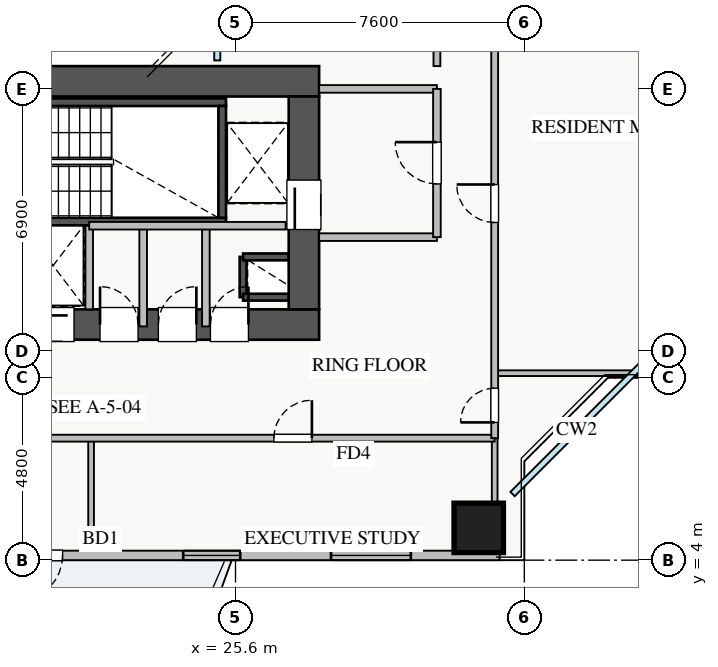
"""IFC4 building model, lengths in metres.
Left out: names, types, materials, properties, quantities, classifications, styles, units other than length and angle.
Written with IfcOpenShell. Run it as: python <this file> out.ifc"""

import sys

from ifc_helpers import new_model, si_unit, direction, frame, frame_2d, origin, origin_2d, place, context, subcontext, project, spatial, rectangle, extrude, source, transform, mapped, element, fill, save


model = new_model("IFC4")
c1 = context("Model", 3, precision=1e-05, world=origin(), true_north=direction((0.0, 1.0)))
c2 = subcontext(c1, "Body", "Model", "MODEL_VIEW")
j1 = project(units=[si_unit("LENGTHUNIT", "METRE"), si_unit("PLANEANGLEUNIT", "RADIAN")], contexts=[c1])
p1 = place(None, origin())
s1 = spatial("IfcSite", under=j1, at=p1, CompositionType="ELEMENT")
p2 = place(p1, origin())
s2 = spatial("IfcBuilding", under=s1, at=p2, CompositionType="ELEMENT")
p3 = place(p2, frame((0.0, 0.0, 82.75)))
s3 = spatial("IfcBuildingStorey", under=s2, at=p3, CompositionType="ELEMENT", Elevation=82.75)
p4 = place(p3, frame((25.8, 10.92, 0.0), z_axis=(0.0, 0.0, 1.0), x_axis=(0.0, 1.0, 0.0)))
e1 = element("IfcWall", 1, at=p4, inside=s3, PredefinedType="SHEAR", context=c2, shape_type="SweptSolid", body=[
    extrude(rectangle(XDim=1.06, YDim=0.18, at=frame_2d((0.53, 0.0))), origin(), (0.0, 0.0, 1.0), 3.07),
])
for number, where, z_axis, x_axis in (
    (2, (25.8, 11.98, 0.0), (0.0, 0.0, 1.0), (1.0, 0.0, 0.0)),
    (3, (25.8, 10.92, 0.0), (0.0, 0.0, 1.0), (1.0, 0.0, 0.0)),
):
    element("IfcWall", number, at=place(p3, frame(where, z_axis=z_axis, x_axis=x_axis)), inside=s3, PredefinedType="SHEAR", context=c2, shape_type="SweptSolid", body=[
        extrude(rectangle(XDim=1.2, YDim=0.18, at=frame_2d((0.6, 0.0))), origin(), (0.0, 0.0, 1.0), 3.07),
    ])
p5 = place(p3, frame((19.88, 12.8, 0.0), z_axis=(0.0, 0.0, 1.0), x_axis=(1.0, 0.0, 0.0)))
e4 = element("IfcWall", 4, at=p5, inside=s3, PredefinedType="SHEAR", context=c2, shape_type="SweptSolid", body=[
    extrude(rectangle(XDim=1.87, YDim=0.18, at=frame_2d((0.935, 0.0))), origin(), (0.0, 0.0, 1.0), 3.07),
])
p6 = place(p3, frame((18.2, 12.91, 0.0), z_axis=(0.0, 0.0, 1.0), x_axis=(1.0, 0.0, 0.0)))
e5 = element("IfcWall", 5, at=p6, inside=s3, PredefinedType="SHEAR", context=c2, shape_type="SweptSolid", body=[
    extrude(rectangle(XDim=7.15, YDim=0.2, at=frame_2d((3.575, 0.0))), origin(), (0.0, 0.0, 1.0), 3.25),
])
p7 = place(p6, frame((0.35, 0.0, 0.0)))
e6 = element("IfcOpeningElement", 6, at=p7, cuts=e5, PredefinedType="OPENING", context=c2, shape_type="SweptSolid", body=[
    extrude(rectangle(XDim=1.1, YDim=2.05, at=frame_2d((0.55, 1.025))), frame((0.0, 0.11, 0.0), z_axis=(0.0, -1.0, 0.0), x_axis=(1.0, 0.0, 0.0)), (0.0, 0.0, 1.0), 0.22),
])
p8 = place(p3, frame((18.2, 16.05, 0.0), z_axis=(0.0, 0.0, 1.0), x_axis=(1.0, 0.0, 0.0)))
e7 = element("IfcWall", 7, at=p8, inside=s3, PredefinedType="SHEAR", context=c2, shape_type="SweptSolid", body=[
    extrude(rectangle(XDim=7.15, YDim=0.2, at=frame_2d((3.575, 0.0))), origin(), (0.0, 0.0, 1.0), 3.25),
])
p9 = place(p3, frame((25.25, 13.01, 0.0), z_axis=(0.0, 0.0, 1.0), x_axis=(0.0, 1.0, 0.0)))
e8 = element("IfcWall", 8, at=p9, inside=s3, PredefinedType="SHEAR", context=c2, shape_type="SweptSolid", body=[
    extrude(rectangle(XDim=2.94, YDim=0.2, at=frame_2d((1.47, 0.0))), origin(), (0.0, 0.0, 1.0), 3.25),
])
p10 = place(p3, frame((10.2, 10.2, 0.0), z_axis=(0.0, 0.0, 1.0), x_axis=(1.0, 0.0, 0.0)))
e9 = element("IfcWall", 9, at=p10, inside=s3, PredefinedType="SHEAR", context=c2, shape_type="SweptSolid", body=[
    extrude(rectangle(XDim=17.6, YDim=0.8, at=frame_2d((8.8, 0.0))), origin(), (0.0, 0.0, 1.0), 3.25),
])
p11 = place(p10, frame((1.15, 0.0, 0.0)))
e10 = element("IfcOpeningElement", 10, at=p11, cuts=e9, PredefinedType="OPENING", context=c2, shape_type="SweptSolid", body=[
    extrude(rectangle(XDim=1.1, YDim=2.05, at=frame_2d((0.55, 1.025))), frame((0.0, 0.41, 0.0), z_axis=(0.0, -1.0, 0.0), x_axis=(1.0, 0.0, 0.0)), (0.0, 0.0, 1.0), 0.82),
])
p12 = place(p10, frame((8.3, 0.0, 0.0)))
e11 = element("IfcOpeningElement", 11, at=p12, cuts=e9, PredefinedType="OPENING", context=c2, shape_type="SweptSolid", body=[
    extrude(rectangle(XDim=1.1, YDim=2.05, at=frame_2d((0.55, 1.025))), frame((0.0, 0.41, 0.0), z_axis=(0.0, -1.0, 0.0), x_axis=(1.0, 0.0, 0.0)), (0.0, 0.0, 1.0), 0.82),
])
p13 = place(p10, frame((10.05, 0.0, 0.0)))
e12 = element("IfcOpeningElement", 12, at=p13, cuts=e9, PredefinedType="OPENING", context=c2, shape_type="SweptSolid", body=[
    extrude(rectangle(XDim=1.1, YDim=2.05, at=frame_2d((0.55, 1.025))), frame((0.0, 0.41, 0.0), z_axis=(0.0, -1.0, 0.0), x_axis=(1.0, 0.0, 0.0)), (0.0, 0.0, 1.0), 0.82),
])
p14 = place(p10, frame((14.74, 0.0, 0.0)))
e13 = element("IfcOpeningElement", 13, at=p14, cuts=e9, PredefinedType="OPENING", context=c2, shape_type="SweptSolid", body=[
    extrude(rectangle(XDim=1.0, YDim=2.05, at=frame_2d((0.5, 1.025))), frame((0.0, 0.41, 0.0), z_axis=(0.0, -1.0, 0.0), x_axis=(1.0, 0.0, 0.0)), (0.0, 0.0, 1.0), 0.82),
])
p15 = place(p10, frame((11.835, 0.0, 0.0)))
e14 = element("IfcOpeningElement", 14, at=p15, cuts=e9, PredefinedType="OPENING", context=c2, shape_type="SweptSolid", body=[
    extrude(rectangle(XDim=1.0, YDim=2.05, at=frame_2d((0.5, 1.025))), frame((0.0, 0.41, 0.0), z_axis=(0.0, -1.0, 0.0), x_axis=(1.0, 0.0, 0.0)), (0.0, 0.0, 1.0), 0.82),
])
p16 = place(p10, frame((13.37, 0.0, 0.0)))
e15 = element("IfcOpeningElement", 15, at=p16, cuts=e9, PredefinedType="OPENING", context=c2, shape_type="SweptSolid", body=[
    extrude(rectangle(XDim=1.0, YDim=2.05, at=frame_2d((0.5, 1.025))), frame((0.0, 0.41, 0.0), z_axis=(0.0, -1.0, 0.0), x_axis=(1.0, 0.0, 0.0)), (0.0, 0.0, 1.0), 0.82),
])
p17 = place(p3, frame((10.2, 16.6, 0.0), z_axis=(0.0, 0.0, 1.0), x_axis=(1.0, 0.0, 0.0)))
e16 = element("IfcWall", 16, at=p17, inside=s3, PredefinedType="SHEAR", context=c2, shape_type="SweptSolid", body=[
    extrude(rectangle(XDim=17.6, YDim=0.8, at=frame_2d((8.8, 0.0))), origin(), (0.0, 0.0, 1.0), 3.25),
])
p18 = place(p3, frame((27.4, 10.6, 0.0), z_axis=(0.0, 0.0, 1.0), x_axis=(0.0, 1.0, 0.0)))
e17 = element("IfcWall", 17, at=p18, inside=s3, PredefinedType="SHEAR", context=c2, shape_type="SweptSolid", body=[
    extrude(rectangle(XDim=5.6, YDim=0.8, at=frame_2d((2.8, 0.0))), origin(), (0.0, 0.0, 1.0), 3.25),
])
p19 = place(p18, frame((2.1, 0.0, 0.0)))
e18 = element("IfcOpeningElement", 18, at=p19, cuts=e17, PredefinedType="OPENING", context=c2, shape_type="SweptSolid", body=[
    extrude(rectangle(XDim=1.3, YDim=2.05, at=frame_2d((0.65, 1.025))), frame((0.0, 0.41, 0.0), z_axis=(0.0, -1.0, 0.0), x_axis=(1.0, 0.0, 0.0)), (0.0, 0.0, 1.0), 0.82),
])
m1 = source(origin(), c2, "Body", "SweptSolid", [
    extrude(rectangle(XDim=1.3, YDim=1.3, at=origin_2d()), origin(), (0.0, 0.0, 1.0), 3.25),
])
p20 = place(p3, frame((32.0, 4.85, 0.0), z_axis=(0.0, 0.0, 1.0), x_axis=(1.0, 0.0, 0.0)))
e19 = element("IfcColumn", 19, at=p20, inside=s3, PredefinedType="COLUMN", context=c2, shape_type="MappedRepresentation", body=[
    mapped(m1, transform((0.0, 0.0, 0.0), x_axis=(1.0, 0.0, 0.0), y_axis=(0.0, 1.0, 0.0), z_axis=(0.0, 0.0, 1.0), scale=1.0)),
])
p21 = place(p3, frame((5.45, 4.125, 0.0), z_axis=(0.0, 0.0, 1.0), x_axis=(1.0, 0.0, 0.0)))
e20 = element("IfcWall", 20, at=p21, inside=s3, PredefinedType="STANDARD", context=c2, shape_type="SweptSolid", body=[
    extrude(rectangle(XDim=27.1, YDim=0.25, at=frame_2d((13.55, 0.0))), origin(), (0.0, 0.0, 1.0), 2.61),
])
p22 = place(p21, frame((14.4, 0.0, 0.0)))
e21 = element("IfcOpeningElement", 21, at=p22, cuts=e20, PredefinedType="OPENING", context=c2, shape_type="SweptSolid", body=[
    extrude(rectangle(XDim=1.2, YDim=2.1, at=frame_2d((0.6, 1.05))), frame((0.0, 0.135, 0.0), z_axis=(0.0, -1.0, 0.0), x_axis=(1.0, 0.0, 0.0)), (0.0, 0.0, 1.0), 0.27),
])
p23 = place(p21, frame((1.365, 0.0, 0.9)))
e22 = element("IfcOpeningElement", 22, at=p23, cuts=e20, PredefinedType="OPENING", context=c2, shape_type="SweptSolid", body=[
    extrude(rectangle(XDim=1.8, YDim=1.5, at=frame_2d((0.9, 0.75))), frame((0.0, 0.135, 0.0), z_axis=(0.0, -1.0, 0.0), x_axis=(1.0, 0.0, 0.0)), (0.0, 0.0, 1.0), 0.27),
])
p24 = place(p21, frame((9.263, 0.0, 0.9)))
e23 = element("IfcOpeningElement", 23, at=p24, cuts=e20, PredefinedType="OPENING", context=c2, shape_type="SweptSolid", body=[
    extrude(rectangle(XDim=1.8, YDim=1.45, at=frame_2d((0.9, 0.725))), frame((0.0, 0.135, 0.0), z_axis=(0.0, -1.0, 0.0), x_axis=(1.0, 0.0, 0.0)), (0.0, 0.0, 1.0), 0.27),
])
p25 = place(p21, frame((18.774, 0.0, 0.9)))
e24 = element("IfcOpeningElement", 24, at=p25, cuts=e20, PredefinedType="OPENING", context=c2, shape_type="SweptSolid", body=[
    extrude(rectangle(XDim=1.5, YDim=1.5, at=frame_2d((0.75, 0.75))), frame((0.0, 0.135, 0.0), z_axis=(0.0, -1.0, 0.0), x_axis=(1.0, 0.0, 0.0)), (0.0, 0.0, 1.0), 0.27),
])
p26 = place(p21, frame((22.663, 0.0, 0.9)))
e25 = element("IfcOpeningElement", 25, at=p26, cuts=e20, PredefinedType="OPENING", context=c2, shape_type="SweptSolid", body=[
    extrude(rectangle(XDim=2.1, YDim=1.48, at=frame_2d((1.05, 0.74))), frame((0.0, 0.135, 0.0), z_axis=(0.0, -1.0, 0.0), x_axis=(1.0, 0.0, 0.0)), (0.0, 0.0, 1.0), 0.27),
])
p27 = place(p21, frame((5.149, 0.0, 0.9)))
e26 = element("IfcOpeningElement", 26, at=p27, cuts=e20, PredefinedType="OPENING", context=c2, shape_type="SweptSolid", body=[
    extrude(rectangle(XDim=2.4, YDim=1.5, at=frame_2d((1.2, 0.75))), frame((0.0, 0.135, 0.0), z_axis=(0.0, -1.0, 0.0), x_axis=(1.0, 0.0, 0.0)), (0.0, 0.0, 1.0), 0.27),
])
for number, where, z_axis, x_axis in (
    (27, (27.8, 16.4, 0.0), (0.0, 0.0, 1.0), (1.0, 0.0, 0.0)),
    (28, (27.8, 12.5, 0.0), (0.0, 0.0, 1.0), (1.0, 0.0, 0.0)),
):
    element("IfcWall", number, at=place(p3, frame(where, z_axis=z_axis, x_axis=x_axis)), inside=s3, PredefinedType="PARTITIONING", context=c2, shape_type="SweptSolid", body=[
        extrude(rectangle(XDim=3.1, YDim=0.2, at=frame_2d((1.55, 0.0))), origin(), (0.0, 0.0, 1.0), 3.07),
    ])
p28 = place(p3, frame((30.9, 12.5, 0.0), z_axis=(0.0, 0.0, 1.0), x_axis=(0.0, 1.0, 0.0)))
e29 = element("IfcWall", 29, at=p28, inside=s3, PredefinedType="PARTITIONING", context=c2, shape_type="SweptSolid", body=[
    extrude(rectangle(XDim=3.9, YDim=0.2, at=frame_2d((1.95, 0.0))), origin(), (0.0, 0.0, 1.0), 3.07),
])
p29 = place(p28, frame((1.4, 0.0, 0.0)))
e30 = element("IfcOpeningElement", 30, at=p29, cuts=e29, PredefinedType="OPENING", context=c2, shape_type="SweptSolid", body=[
    extrude(rectangle(XDim=1.1, YDim=2.05, at=frame_2d((0.55, 1.025))), frame((0.0, 0.11, 0.0), z_axis=(0.0, -1.0, 0.0), x_axis=(1.0, 0.0, 0.0)), (0.0, 0.0, 1.0), 0.22),
])
p30 = place(p3, frame((24.82, 10.15, 0.0), z_axis=(0.0, 0.0, 1.0), x_axis=(0.0, 1.0, 0.0)))
e31 = element("IfcWall", 31, at=p30, inside=s3, PredefinedType="PARTITIONING", context=c2, shape_type="SweptSolid", body=[
    extrude(rectangle(XDim=2.65, YDim=0.2, at=frame_2d((1.325, 0.0))), origin(), (0.0, 0.0, 1.0), 3.07),
])
p31 = place(p3, frame((21.75, 10.6, 0.0), z_axis=(0.0, 0.0, 1.0), x_axis=(0.0, 1.0, 0.0)))
e32 = element("IfcWall", 32, at=p31, inside=s3, PredefinedType="PARTITIONING", context=c2, shape_type="SweptSolid", body=[
    extrude(rectangle(XDim=2.2, YDim=0.2, at=frame_2d((1.1, 0.0))), origin(), (0.0, 0.0, 1.0), 3.07),
])
p32 = place(p3, frame((23.17, 10.15, 0.0), z_axis=(0.0, 0.0, 1.0), x_axis=(0.0, 1.0, 0.0)))
e33 = element("IfcWall", 33, at=p32, inside=s3, PredefinedType="PARTITIONING", context=c2, shape_type="SweptSolid", body=[
    extrude(rectangle(XDim=2.65, YDim=0.2, at=frame_2d((1.325, 0.0))), origin(), (0.0, 0.0, 1.0), 3.07),
])
p33 = place(p3, frame((21.75, 12.8, 0.0), z_axis=(0.0, 0.0, 1.0), x_axis=(1.0, 0.0, 0.0)))
e34 = element("IfcWall", 34, at=p33, inside=s3, PredefinedType="PARTITIONING", context=c2, shape_type="SweptSolid", body=[
    extrude(rectangle(XDim=5.17, YDim=0.2, at=frame_2d((2.585, 0.0))), origin(), (0.0, 0.0, 1.0), 3.07),
])
for number, where, z_axis, x_axis in (
    (35, (21.8, 4.25, 0.0), (0.0, 0.0, 1.0), (0.0, 1.0, 0.0)),
    (36, (32.42, 4.25, 0.0), (0.0, 0.0, 1.0), (0.0, 1.0, 0.0)),
):
    element("IfcWall", number, at=place(p3, frame(where, z_axis=z_axis, x_axis=x_axis)), inside=s3, PredefinedType="PARTITIONING", context=c2, shape_type="SweptSolid", body=[
        extrude(rectangle(XDim=2.96, YDim=0.15, at=frame_2d((1.48, 0.0))), origin(), (0.0, 0.0, 1.0), 3.07),
    ])
p34 = place(p3, frame((8.85, 7.21, 0.0), z_axis=(0.0, 0.0, 1.0), x_axis=(1.0, 0.0, 0.0)))
e37 = element("IfcWall", 37, at=p34, inside=s3, PredefinedType="PARTITIONING", context=c2, shape_type="SweptSolid", body=[
    extrude(rectangle(XDim=23.57, YDim=0.18, at=frame_2d((11.785, 0.0))), origin(), (0.0, 0.0, 1.0), 3.07),
])
p35 = place(p34, frame((5.975, 0.0, 0.0)))
e38 = element("IfcOpeningElement", 38, at=p35, cuts=e37, PredefinedType="OPENING", context=c2, shape_type="SweptSolid", body=[
    extrude(rectangle(XDim=1.0, YDim=2.05, at=frame_2d((0.5, 1.025))), frame((0.0, 0.1, 0.0), z_axis=(0.0, -1.0, 0.0), x_axis=(1.0, 0.0, 0.0)), (0.0, 0.0, 1.0), 0.2),
])
p36 = place(p34, frame((17.76, 0.0, 0.0)))
e39 = element("IfcOpeningElement", 39, at=p36, cuts=e37, PredefinedType="OPENING", context=c2, shape_type="SweptSolid", body=[
    extrude(rectangle(XDim=1.0, YDim=2.05, at=frame_2d((0.5, 1.025))), frame((0.0, 0.1, 0.0), z_axis=(0.0, -1.0, 0.0), x_axis=(1.0, 0.0, 0.0)), (0.0, 0.0, 1.0), 0.2),
])
p37 = place(p3, frame((32.42, 8.92, 0.0), z_axis=(0.0, 0.0, 1.0), x_axis=(1.0, 0.0, 0.0)))
e40 = element("IfcWall", 40, at=p37, inside=s3, PredefinedType="PARTITIONING", context=c2, shape_type="SweptSolid", body=[
    extrude(rectangle(XDim=5.33, YDim=0.15, at=frame_2d((2.665, 0.0))), origin(), (0.0, 0.0, 1.0), 3.07),
])
p38 = place(p3, frame((32.42, 7.21, 0.0), z_axis=(0.0, 0.0, 1.0), x_axis=(0.0, 1.0, 0.0)))
e41 = element("IfcWall", 41, at=p38, inside=s3, PredefinedType="PARTITIONING", context=c2, shape_type="SweptSolid", body=[
    extrude(rectangle(XDim=31.23, YDim=0.18, at=frame_2d((15.615, 0.0))), origin(), (0.0, 0.0, 1.0), 2.865),
])
p39 = place(p38, frame((30.09, 0.0, 0.0)))
e42 = element("IfcOpeningElement", 42, at=p39, cuts=e41, PredefinedType="OPENING", context=c2, shape_type="SweptSolid", body=[
    extrude(rectangle(XDim=0.9, YDim=2.05, at=frame_2d((0.45, 1.025))), frame((0.0, 0.1, 0.0), z_axis=(0.0, -1.0, 0.0), x_axis=(1.0, 0.0, 0.0)), (0.0, 0.0, 1.0), 0.2),
])
p40 = place(p38, frame((0.415, 0.0, 0.0)))
e43 = element("IfcOpeningElement", 43, at=p40, cuts=e41, PredefinedType="OPENING", context=c2, shape_type="SweptSolid", body=[
    extrude(rectangle(XDim=0.9, YDim=2.05, at=frame_2d((0.45, 1.025))), frame((0.0, 0.1, 0.0), z_axis=(0.0, -1.0, 0.0), x_axis=(1.0, 0.0, 0.0)), (0.0, 0.0, 1.0), 0.2),
])
p41 = place(p38, frame((5.675, 0.0, 0.0)))
e44 = element("IfcOpeningElement", 44, at=p41, cuts=e41, PredefinedType="OPENING", context=c2, shape_type="SweptSolid", body=[
    extrude(rectangle(XDim=1.0, YDim=2.05, at=frame_2d((0.5, 1.025))), frame((0.0, 0.1, 0.0), z_axis=(0.0, -1.0, 0.0), x_axis=(1.0, 0.0, 0.0)), (0.0, 0.0, 1.0), 0.2),
])
p42 = place(p38, frame((12.575, 0.0, 0.0)))
e45 = element("IfcOpeningElement", 45, at=p42, cuts=e41, PredefinedType="OPENING", context=c2, shape_type="SweptSolid", body=[
    extrude(rectangle(XDim=1.0, YDim=2.05, at=frame_2d((0.5, 1.025))), frame((0.0, 0.1, 0.0), z_axis=(0.0, -1.0, 0.0), x_axis=(1.0, 0.0, 0.0)), (0.0, 0.0, 1.0), 0.2),
])
p43 = place(p38, frame((22.5, 0.0, 0.0)))
e46 = element("IfcOpeningElement", 46, at=p43, cuts=e41, PredefinedType="OPENING", context=c2, shape_type="SweptSolid", body=[
    extrude(rectangle(XDim=1.0, YDim=2.05, at=frame_2d((0.5, 1.025))), frame((0.0, 0.1, 0.0), z_axis=(0.0, -1.0, 0.0), x_axis=(1.0, 0.0, 0.0)), (0.0, 0.0, 1.0), 0.2),
])
p44 = place(p3, frame((30.9, 17.0, 0.0), z_axis=(0.0, 0.0, 1.0), x_axis=(0.0, 1.0, 0.0)))
e47 = element("IfcWall", 47, at=p44, inside=s3, PredefinedType="PARTITIONING", context=c2, shape_type="SweptSolid", body=[
    extrude(rectangle(XDim=12.0, YDim=0.18, at=frame_2d((6.0, 0.0))), origin(), (0.0, 0.0, 1.0), 3.07),
])
p45 = place(p44, frame((1.02, 0.0, 0.0)))
e48 = element("IfcOpeningElement", 48, at=p45, cuts=e47, PredefinedType="OPENING", context=c2, shape_type="SweptSolid", body=[
    extrude(rectangle(XDim=1.0, YDim=2.05, at=frame_2d((0.5, 1.025))), frame((0.0, 0.1, 0.0), z_axis=(0.0, -1.0, 0.0), x_axis=(1.0, 0.0, 0.0)), (0.0, 0.0, 1.0), 0.2),
])
p46 = place(p44, frame((7.17, 0.0, 0.0)))
e49 = element("IfcOpeningElement", 49, at=p46, cuts=e47, PredefinedType="OPENING", context=c2, shape_type="SweptSolid", body=[
    extrude(rectangle(XDim=1.0, YDim=2.05, at=frame_2d((0.5, 1.025))), frame((0.0, 0.1, 0.0), z_axis=(0.0, -1.0, 0.0), x_axis=(1.0, 0.0, 0.0)), (0.0, 0.0, 1.0), 0.2),
])
m2 = source(origin(), c2, "Body", "SweptSolid", [
    extrude(rectangle(XDim=1.2, YDim=2.1, at=frame_2d((0.6, 1.05))), frame((0.0, 0.025, 0.0), z_axis=(0.0, -1.0, 0.0), x_axis=(1.0, 0.0, 0.0)), (0.0, 0.0, 1.0), 0.05),
])
p47 = place(p22, frame((1.2, 0.0, 0.0), z_axis=(0.0, 0.0, 1.0), x_axis=(-1.0, 0.0, 0.0)))
e50 = element("IfcDoor", 50, at=p47, inside=s3, OperationType="SINGLE_SWING_LEFT", PredefinedType="DOOR", context=c2, shape_type="MappedRepresentation", body=[
    mapped(m2, transform((0.0, 0.0, 0.0), x_axis=(1.0, 0.0, 0.0), y_axis=(0.0, 1.0, 0.0), z_axis=(0.0, 0.0, 1.0), scale=1.0)),
])
fill(e21, e50)
m3 = source(origin(), c2, "Body", "SweptSolid", [
    extrude(rectangle(XDim=1.5, YDim=1.5, at=frame_2d((0.75, 0.75))), frame((0.0, 0.03, 0.0), z_axis=(0.0, -1.0, 0.0), x_axis=(1.0, 0.0, 0.0)), (0.0, 0.0, 1.0), 0.06),
])
p48 = place(p25, origin())
e51 = element("IfcWindow", 51, at=p48, inside=s3, PartitioningType="DOUBLE_PANEL_VERTICAL", PredefinedType="WINDOW", context=c2, shape_type="MappedRepresentation", body=[
    mapped(m3, transform((0.0, 0.0, 0.0), x_axis=(1.0, 0.0, 0.0), y_axis=(0.0, 1.0, 0.0), z_axis=(0.0, 0.0, 1.0), scale=1.0)),
])
fill(e24, e51)
m4 = source(origin(), c2, "Body", "SweptSolid", [
    extrude(rectangle(XDim=2.1, YDim=1.48, at=frame_2d((1.05, 0.74))), frame((0.0, 0.03, 0.0), z_axis=(0.0, -1.0, 0.0), x_axis=(1.0, 0.0, 0.0)), (0.0, 0.0, 1.0), 0.06),
])
p49 = place(p26, origin())
e52 = element("IfcWindow", 52, at=p49, inside=s3, PartitioningType="TRIPLE_PANEL_VERTICAL", PredefinedType="WINDOW", context=c2, shape_type="MappedRepresentation", body=[
    mapped(m4, transform((0.0, 0.0, 0.0), x_axis=(1.0, 0.0, 0.0), y_axis=(0.0, 1.0, 0.0), z_axis=(0.0, 0.0, 1.0), scale=1.0)),
])
fill(e25, e52)
m5 = source(origin(), c2, "Body", "SweptSolid", [
    extrude(rectangle(XDim=1.3, YDim=2.05, at=frame_2d((0.65, 1.025))), frame((0.0, 0.025, 0.0), z_axis=(0.0, -1.0, 0.0), x_axis=(1.0, 0.0, 0.0)), (0.0, 0.0, 1.0), 0.05),
])
p50 = place(p19, origin())
e53 = element("IfcDoor", 53, at=p50, inside=s3, OperationType="SLIDING_TO_RIGHT", PredefinedType="DOOR", context=c2, shape_type="MappedRepresentation", body=[
    mapped(m5, transform((0.0, 0.0, 0.0), x_axis=(1.0, 0.0, 0.0), y_axis=(0.0, 1.0, 0.0), z_axis=(0.0, 0.0, 1.0), scale=1.0)),
])
fill(e18, e53)
m6 = source(origin(), c2, "Body", "SweptSolid", [
    extrude(rectangle(XDim=1.1, YDim=2.05, at=frame_2d((0.55, 1.025))), frame((0.0, 0.025, 0.0), z_axis=(0.0, -1.0, 0.0), x_axis=(1.0, 0.0, 0.0)), (0.0, 0.0, 1.0), 0.05),
])
p51 = place(p13, origin())
e54 = element("IfcDoor", 54, at=p51, inside=s3, OperationType="SLIDING_TO_RIGHT", PredefinedType="DOOR", context=c2, shape_type="MappedRepresentation", body=[
    mapped(m6, transform((0.0, 0.0, 0.0), x_axis=(1.0, 0.0, 0.0), y_axis=(0.0, 1.0, 0.0), z_axis=(0.0, 0.0, 1.0), scale=1.0)),
])
fill(e12, e54)
m7 = source(origin(), c2, "Body", "SweptSolid", [
    extrude(rectangle(XDim=1.0, YDim=2.05, at=frame_2d((0.5, 1.025))), frame((0.0, 0.025, 0.0), z_axis=(0.0, -1.0, 0.0), x_axis=(1.0, 0.0, 0.0)), (0.0, 0.0, 1.0), 0.05),
])
p52 = place(p14, origin())
e55 = element("IfcDoor", 55, at=p52, inside=s3, OperationType="SINGLE_SWING_RIGHT", PredefinedType="DOOR", context=c2, shape_type="MappedRepresentation", body=[
    mapped(m7, transform((0.0, 0.0, 0.0), x_axis=(1.0, 0.0, 0.0), y_axis=(0.0, 1.0, 0.0), z_axis=(0.0, 0.0, 1.0), scale=1.0)),
])
fill(e13, e55)
p53 = place(p15, origin())
e56 = element("IfcDoor", 56, at=p53, inside=s3, OperationType="SINGLE_SWING_LEFT", PredefinedType="DOOR", context=c2, shape_type="MappedRepresentation", body=[
    mapped(m7, transform((0.0, 0.0, 0.0), x_axis=(1.0, 0.0, 0.0), y_axis=(0.0, 1.0, 0.0), z_axis=(0.0, 0.0, 1.0), scale=1.0)),
])
fill(e14, e56)
p54 = place(p16, origin())
e57 = element("IfcDoor", 57, at=p54, inside=s3, OperationType="SINGLE_SWING_RIGHT", PredefinedType="DOOR", context=c2, shape_type="MappedRepresentation", body=[
    mapped(m7, transform((0.0, 0.0, 0.0), x_axis=(1.0, 0.0, 0.0), y_axis=(0.0, 1.0, 0.0), z_axis=(0.0, 0.0, 1.0), scale=1.0)),
])
fill(e15, e57)
p55 = place(p29, origin())
e58 = element("IfcDoor", 58, at=p55, inside=s3, OperationType="SINGLE_SWING_RIGHT", PredefinedType="DOOR", context=c2, shape_type="MappedRepresentation", body=[
    mapped(m6, transform((0.0, 0.0, 0.0), x_axis=(1.0, 0.0, 0.0), y_axis=(0.0, 1.0, 0.0), z_axis=(0.0, 0.0, 1.0), scale=1.0)),
])
fill(e30, e58)
p56 = place(p36, origin())
e59 = element("IfcDoor", 59, at=p56, inside=s3, OperationType="SINGLE_SWING_RIGHT", PredefinedType="DOOR", context=c2, shape_type="MappedRepresentation", body=[
    mapped(m7, transform((0.0, 0.0, 0.0), x_axis=(1.0, 0.0, 0.0), y_axis=(0.0, 1.0, 0.0), z_axis=(0.0, 0.0, 1.0), scale=1.0)),
])
fill(e39, e59)
m8 = source(origin(), c2, "Body", "SweptSolid", [
    extrude(rectangle(XDim=0.9, YDim=2.05, at=frame_2d((0.45, 1.025))), frame((0.0, 0.025, 0.0), z_axis=(0.0, -1.0, 0.0), x_axis=(1.0, 0.0, 0.0)), (0.0, 0.0, 1.0), 0.05),
])
p57 = place(p40, origin())
e60 = element("IfcDoor", 60, at=p57, inside=s3, OperationType="SINGLE_SWING_LEFT", PredefinedType="DOOR", context=c2, shape_type="MappedRepresentation", body=[
    mapped(m8, transform((0.0, 0.0, 0.0), x_axis=(1.0, 0.0, 0.0), y_axis=(0.0, 1.0, 0.0), z_axis=(0.0, 0.0, 1.0), scale=1.0)),
])
fill(e43, e60)
p58 = place(p41, origin())
e61 = element("IfcDoor", 61, at=p58, inside=s3, OperationType="SINGLE_SWING_RIGHT", PredefinedType="DOOR", context=c2, shape_type="MappedRepresentation", body=[
    mapped(m7, transform((0.0, 0.0, 0.0), x_axis=(1.0, 0.0, 0.0), y_axis=(0.0, 1.0, 0.0), z_axis=(0.0, 0.0, 1.0), scale=1.0)),
])
fill(e44, e61)
save(model, sys.argv[1])
